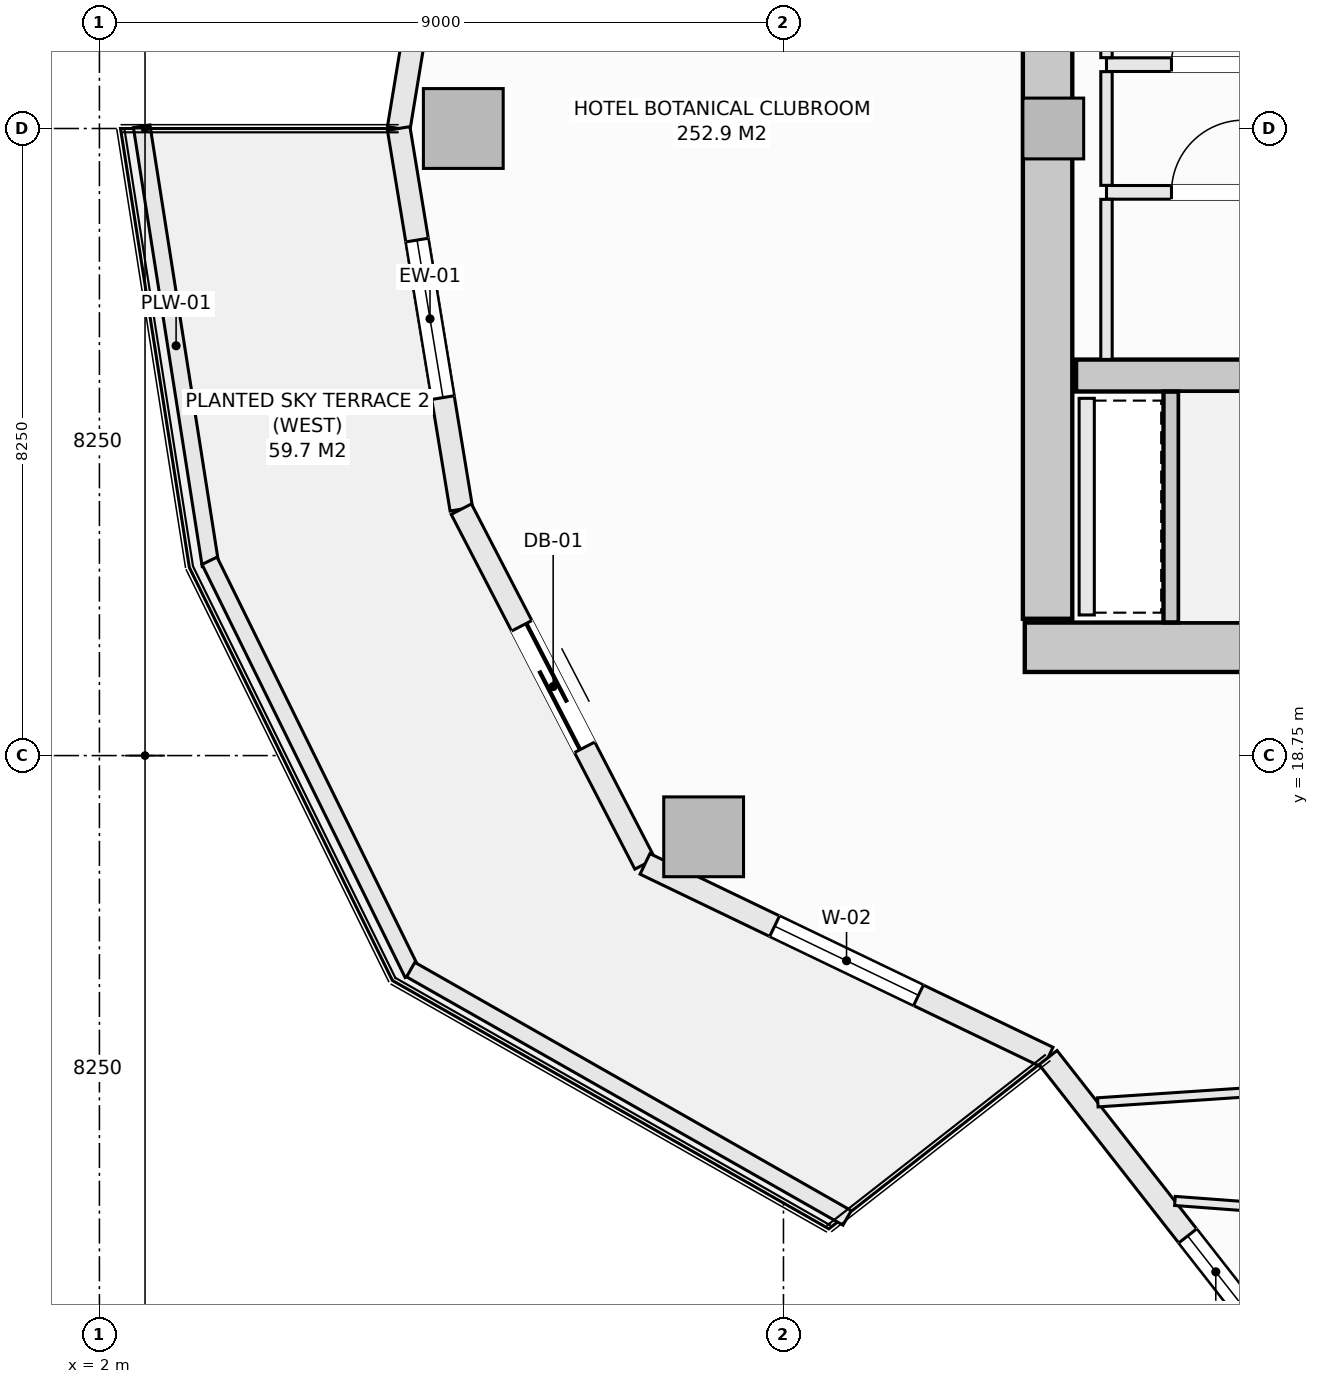
"""IFC4 building model, lengths in metres.
Left out: names, types, materials, properties, quantities, classifications, styles, units other than length and angle.
Written with IfcOpenShell. Run it as: python <this file> out.ifc"""

import sys

from ifc_helpers import new_model, si_unit, direction, frame, frame_2d, origin, origin_2d, place, context, subcontext, project, spatial, rectangle, extrude, element, fill, save


model = new_model("IFC4")
c1 = context("Model", 3, precision=1e-05, world=origin(), true_north=direction((0.0, 1.0)))
c2 = subcontext(c1, "Body", "Model", "MODEL_VIEW")
j1 = project(units=[si_unit("LENGTHUNIT", "METRE"), si_unit("PLANEANGLEUNIT", "RADIAN")], contexts=[c1])
p1 = place(None, origin())
s1 = spatial("IfcSite", under=j1, at=p1, CompositionType="ELEMENT")
p2 = place(p1, origin())
s2 = spatial("IfcBuilding", under=s1, at=p2, CompositionType="ELEMENT")
p3 = place(p2, frame((0.0, 0.0, 125.7)))
s3 = spatial("IfcBuildingStorey", under=s2, at=p3, CompositionType="ELEMENT", Elevation=125.7)
p4 = place(p3, frame((14.175, 20.175, -0.27), z_axis=(0.0, 0.0, 1.0), x_axis=(1.0, 0.0, 0.0)))
e1 = element("IfcWall", 1, at=p4, inside=s3, PredefinedType="SHEAR", context=c2, shape_type="SweptSolid", body=[
    extrude(rectangle(XDim=13.65, YDim=0.65, at=frame_2d((6.825, 0.0))), origin(), (0.0, 0.0, 1.0), 3.4),
])
p5 = place(p3, frame((14.475, 20.55, -0.27), z_axis=(0.0, 0.0, 1.0), x_axis=(0.0, 1.0, 0.0)))
e2 = element("IfcWall", 2, at=p5, inside=s3, PredefinedType="SHEAR", context=c2, shape_type="SweptSolid", body=[
    extrude(rectangle(XDim=12.9, YDim=0.65, at=frame_2d((6.45, 0.0))), origin(), (0.0, 0.0, 1.0), 3.4),
])
p6 = place(p3, frame((14.85, 23.75, -0.27), z_axis=(0.0, 0.0, 1.0), x_axis=(1.0, 0.0, 0.0)))
e3 = element("IfcWall", 3, at=p6, inside=s3, PredefinedType="SHEAR", context=c2, shape_type="SweptSolid", body=[
    extrude(rectangle(XDim=7.3, YDim=0.42, at=frame_2d((3.65, 0.0))), origin(), (0.0, 0.0, 1.0), 3.4),
])
for number, where, z_axis, x_axis in (
    (4, (6.788, 27.0, -0.27), (0.0, 0.0, 1.0), (1.0, 0.0, 0.0)),
    (5, (9.95, 17.681, -0.27), (0.0, 0.0, 1.0), (1.0, 0.0, 0.0)),
):
    element("IfcColumn", number, at=place(p3, frame(where, z_axis=z_axis, x_axis=x_axis)), inside=s3, PredefinedType="COLUMN", context=c2, shape_type="SweptSolid", body=[
        extrude(rectangle(XDim=1.05, YDim=1.05, at=origin_2d()), origin(), (0.0, 0.0, 1.0), 3.4),
    ])
p7 = place(p3, frame((14.55, 27.0, -0.27), z_axis=(0.0, 0.0, 1.0), x_axis=(1.0, 0.0, 0.0)))
e6 = element("IfcColumn", 6, at=p7, inside=s3, PredefinedType="PILASTER", context=c2, shape_type="SweptSolid", body=[
    extrude(rectangle(XDim=0.8, YDim=0.8, at=origin_2d()), origin(), (0.0, 0.0, 1.0), 3.4),
])
p8 = place(p3, frame((5.938, 27.0, 0.0), z_axis=(0.0, 0.0, 1.0), x_axis=(0.162393944769, 0.986726003864, 0.0)))
e7 = element("IfcWall", 7, at=p8, inside=s3, PredefinedType="SOLIDWALL", context=c2, shape_type="SweptSolid", body=[
    extrude(rectangle(XDim=5.075, YDim=0.3, at=frame_2d((2.538, 0.0))), origin(), (0.0, 0.0, 1.0), 2.653),
])
p9 = place(p8, frame((1.488, 0.0, 0.74)))
e8 = element("IfcOpeningElement", 8, at=p9, cuts=e7, PredefinedType="OPENING", context=c2, shape_type="SweptSolid", body=[
    extrude(rectangle(XDim=2.1, YDim=1.7, at=frame_2d((1.05, 0.85))), frame((0.0, 0.16, 0.0), z_axis=(0.0, -1.0, 0.0), x_axis=(1.0, 0.0, 0.0)), (0.0, 0.0, 1.0), 0.32),
])
p10 = place(p3, frame((5.938, 27.0, 0.0), z_axis=(0.0, 0.0, 1.0), x_axis=(0.162393944769, -0.986726003864, 0.0)))
e9 = element("IfcWall", 9, at=p10, inside=s3, PredefinedType="SOLIDWALL", context=c2, shape_type="SweptSolid", body=[
    extrude(rectangle(XDim=5.075, YDim=0.3, at=frame_2d((2.538, 0.0))), origin(), (0.0, 0.0, 1.0), 2.653),
])
p11 = place(p10, frame((1.488, 0.0, 0.74)))
e10 = element("IfcOpeningElement", 10, at=p11, cuts=e9, PredefinedType="OPENING", context=c2, shape_type="SweptSolid", body=[
    extrude(rectangle(XDim=2.1, YDim=1.7, at=frame_2d((1.05, 0.85))), frame((0.0, 0.16, 0.0), z_axis=(0.0, -1.0, 0.0), x_axis=(1.0, 0.0, 0.0)), (0.0, 0.0, 1.0), 0.32),
])
p12 = place(p3, frame((6.762, 21.992, 0.0), z_axis=(0.0, 0.0, 1.0), x_axis=(0.459767899643, -0.888039119892, 0.0)))
e11 = element("IfcWall", 11, at=p12, inside=s3, PredefinedType="SOLIDWALL", context=c2, shape_type="SweptSolid", body=[
    extrude(rectangle(XDim=5.255, YDim=0.3, at=frame_2d((2.628, 0.0))), origin(), (0.0, 0.0, 1.0), 2.653),
])
p13 = place(p12, frame((1.728, 0.0, 0.0)))
e12 = element("IfcOpeningElement", 12, at=p13, cuts=e11, PredefinedType="OPENING", context=c2, shape_type="SweptSolid", body=[
    extrude(rectangle(XDim=1.8, YDim=2.25, at=frame_2d((0.9, 1.125))), frame((0.0, 0.16, 0.0), z_axis=(0.0, -1.0, 0.0), x_axis=(1.0, 0.0, 0.0)), (0.0, 0.0, 1.0), 0.32),
])
p14 = place(p3, frame((9.178, 17.325, 0.0), z_axis=(0.0, 0.0, 1.0), x_axis=(0.901370184739, -0.433049408339, 0.0)))
e13 = element("IfcWall", 13, at=p14, inside=s3, PredefinedType="SOLIDWALL", context=c2, shape_type="SweptSolid", body=[
    extrude(rectangle(XDim=5.884, YDim=0.3, at=frame_2d((2.942, 0.0))), origin(), (0.0, 0.0, 1.0), 2.653),
])
p15 = place(p14, frame((1.892, 0.0, 0.74)))
e14 = element("IfcOpeningElement", 14, at=p15, cuts=e13, PredefinedType="OPENING", context=c2, shape_type="SweptSolid", body=[
    extrude(rectangle(XDim=2.1, YDim=1.7, at=frame_2d((1.05, 0.85))), frame((0.0, 0.16, 0.0), z_axis=(0.0, -1.0, 0.0), x_axis=(1.0, 0.0, 0.0)), (0.0, 0.0, 1.0), 0.32),
])
p16 = place(p3, frame((14.481, 14.777, 0.0), z_axis=(0.0, 0.0, 1.0), x_axis=(0.616435134162, -0.787405693001, 0.0)))
e15 = element("IfcWall", 15, at=p16, inside=s3, PredefinedType="SOLIDWALL", context=c2, shape_type="SweptSolid", body=[
    extrude(rectangle(XDim=5.759, YDim=0.3, at=frame_2d((2.879, 0.0))), origin(), (0.0, 0.0, 1.0), 2.653),
])
p17 = place(p16, frame((2.98, 0.0, 0.72)))
e16 = element("IfcOpeningElement", 16, at=p17, cuts=e15, PredefinedType="OPENING", context=c2, shape_type="SweptSolid", body=[
    extrude(rectangle(XDim=1.2, YDim=1.65, at=frame_2d((0.6, 0.825))), frame((0.0, 0.16, 0.0), z_axis=(0.0, -1.0, 0.0), x_axis=(1.0, 0.0, 0.0)), (0.0, 0.0, 1.0), 0.32),
])
p18 = place(p3, frame((2.556, 27.029, 0.0), z_axis=(0.0, 0.0, 1.0), x_axis=(0.154903030247, -0.987929679289, 0.0)))
e17 = element("IfcWall", 17, at=p18, inside=s3, PredefinedType="PARAPET", context=c2, shape_type="SweptSolid", body=[
    extrude(rectangle(XDim=5.846, YDim=0.22, at=frame_2d((2.923, 0.0))), origin(), (0.0, 0.0, 1.0), 0.52),
])
p19 = place(p3, frame((3.449, 21.313, 0.0), z_axis=(0.0, 0.0, 1.0), x_axis=(0.441269631716, -0.897374566235, 0.0)))
e18 = element("IfcWall", 18, at=p19, inside=s3, PredefinedType="PARAPET", context=c2, shape_type="SweptSolid", body=[
    extrude(rectangle(XDim=6.056, YDim=0.22, at=frame_2d((3.028, 0.0))), origin(), (0.0, 0.0, 1.0), 0.52),
])
p20 = place(p3, frame((6.095, 15.934, 0.0), z_axis=(0.0, 0.0, 1.0), x_axis=(0.869187658335, -0.494482370361, 0.0)))
e19 = element("IfcWall", 19, at=p20, inside=s3, PredefinedType="PARAPET", context=c2, shape_type="SweptSolid", body=[
    extrude(rectangle(XDim=6.606, YDim=0.22, at=frame_2d((3.303, 0.0))), origin(), (0.0, 0.0, 1.0), 0.52),
])
p21 = place(p3, frame((16.1, 20.502, -0.27), z_axis=(0.0, 0.0, 1.0), x_axis=(0.0, 1.0, 0.0)))
e20 = element("IfcWall", 20, at=p21, inside=s3, PredefinedType="SHEAR", context=c2, shape_type="SweptSolid", body=[
    extrude(rectangle(XDim=3.036, YDim=0.2, at=frame_2d((1.518, 0.0))), origin(), (0.0, 0.0, 1.0), 3.4),
])
p22 = place(p3, frame((14.99, 20.6, 0.0), z_axis=(0.0, 0.0, 1.0), x_axis=(0.0, 1.0, 0.0)))
e21 = element("IfcWall", 21, at=p22, inside=s3, PredefinedType="SOLIDWALL", context=c2, shape_type="SweptSolid", body=[
    extrude(rectangle(XDim=2.85, YDim=0.2, at=frame_2d((1.425, 0.0))), origin(), (0.0, 0.0, 1.0), 3.13),
])
p23 = place(p3, frame((15.25, 27.84, 0.0), z_axis=(0.0, 0.0, 1.0), x_axis=(1.0, 0.0, 0.0)))
e22 = element("IfcWall", 22, at=p23, inside=s3, PredefinedType="SOLIDWALL", context=c2, shape_type="SweptSolid", body=[
    extrude(rectangle(XDim=6.9, YDim=0.18, at=frame_2d((3.45, 0.0))), origin(), (0.0, 0.0, 1.0), 3.13),
])
p24 = place(p23, frame((5.02, 0.0, 0.0)))
e23 = element("IfcOpeningElement", 23, at=p24, cuts=e22, PredefinedType="OPENING", context=c2, shape_type="SweptSolid", body=[
    extrude(rectangle(XDim=0.95, YDim=2.1, at=frame_2d((0.475, 1.05))), frame((0.0, 0.1, 0.0), z_axis=(0.0, -1.0, 0.0), x_axis=(1.0, 0.0, 0.0)), (0.0, 0.0, 1.0), 0.2),
])
p25 = place(p23, frame((0.855, 0.0, 0.0)))
e24 = element("IfcOpeningElement", 24, at=p25, cuts=e22, PredefinedType="OPENING", context=c2, shape_type="SweptSolid", body=[
    extrude(rectangle(XDim=0.95, YDim=2.1, at=frame_2d((0.475, 1.05))), frame((0.0, 0.1, 0.0), z_axis=(0.0, -1.0, 0.0), x_axis=(1.0, 0.0, 0.0)), (0.0, 0.0, 1.0), 0.2),
])
p26 = place(p23, frame((2.9, 0.0, 0.0)))
e25 = element("IfcOpeningElement", 25, at=p26, cuts=e22, PredefinedType="OPENING", context=c2, shape_type="SweptSolid", body=[
    extrude(rectangle(XDim=0.95, YDim=2.1, at=frame_2d((0.475, 1.05))), frame((0.0, 0.1, 0.0), z_axis=(0.0, -1.0, 0.0), x_axis=(1.0, 0.0, 0.0)), (0.0, 0.0, 1.0), 0.2),
])
p27 = place(p3, frame((15.25, 26.16, 0.0), z_axis=(0.0, 0.0, 1.0), x_axis=(1.0, 0.0, 0.0)))
e26 = element("IfcWall", 26, at=p27, inside=s3, PredefinedType="SOLIDWALL", context=c2, shape_type="SweptSolid", body=[
    extrude(rectangle(XDim=6.9, YDim=0.18, at=frame_2d((3.45, 0.0))), origin(), (0.0, 0.0, 1.0), 3.13),
])
p28 = place(p27, frame((5.02, 0.0, 0.0)))
e27 = element("IfcOpeningElement", 27, at=p28, cuts=e26, PredefinedType="OPENING", context=c2, shape_type="SweptSolid", body=[
    extrude(rectangle(XDim=0.95, YDim=2.1, at=frame_2d((0.475, 1.05))), frame((0.0, 0.1, 0.0), z_axis=(0.0, -1.0, 0.0), x_axis=(1.0, 0.0, 0.0)), (0.0, 0.0, 1.0), 0.2),
])
p29 = place(p27, frame((0.855, 0.0, 0.0)))
e28 = element("IfcOpeningElement", 28, at=p29, cuts=e26, PredefinedType="OPENING", context=c2, shape_type="SweptSolid", body=[
    extrude(rectangle(XDim=0.95, YDim=2.1, at=frame_2d((0.475, 1.05))), frame((0.0, 0.1, 0.0), z_axis=(0.0, -1.0, 0.0), x_axis=(1.0, 0.0, 0.0)), (0.0, 0.0, 1.0), 0.2),
])
p30 = place(p27, frame((2.9, 0.0, 0.0)))
e29 = element("IfcOpeningElement", 29, at=p30, cuts=e26, PredefinedType="OPENING", context=c2, shape_type="SweptSolid", body=[
    extrude(rectangle(XDim=0.95, YDim=2.1, at=frame_2d((0.475, 1.05))), frame((0.0, 0.1, 0.0), z_axis=(0.0, -1.0, 0.0), x_axis=(1.0, 0.0, 0.0)), (0.0, 0.0, 1.0), 0.2),
])
p31 = place(p3, frame((15.25, 23.962, 0.0), z_axis=(0.0, 0.0, 1.0), x_axis=(0.0, 1.0, 0.0)))
e30 = element("IfcWall", 30, at=p31, inside=s3, PredefinedType="PARTITIONING", context=c2, shape_type="SweptSolid", body=[
    extrude(rectangle(XDim=2.106, YDim=0.15, at=frame_2d((1.053, 0.0))), origin(), (0.0, 0.0, 1.0), 3.13),
])
p32 = place(p3, frame((15.25, 26.252, 0.0), z_axis=(0.0, 0.0, 1.0), x_axis=(0.0, 1.0, 0.0)))
e31 = element("IfcWall", 31, at=p32, inside=s3, PredefinedType="PARTITIONING", context=c2, shape_type="SweptSolid", body=[
    extrude(rectangle(XDim=1.496, YDim=0.15, at=frame_2d((0.748, 0.0))), origin(), (0.0, 0.0, 1.0), 3.13),
])
p33 = place(p3, frame((15.25, 27.932, 0.0), z_axis=(0.0, 0.0, 1.0), x_axis=(0.0, 1.0, 0.0)))
e32 = element("IfcWall", 32, at=p33, inside=s3, PredefinedType="PARTITIONING", context=c2, shape_type="SweptSolid", body=[
    extrude(rectangle(XDim=2.106, YDim=0.15, at=frame_2d((1.053, 0.0))), origin(), (0.0, 0.0, 1.0), 3.13),
])
p34 = place(p3, frame((15.135, 14.188, 0.0), z_axis=(0.0, 0.0, 1.0), x_axis=(0.997761371355, 0.066874852018, 0.0)))
e33 = element("IfcWall", 33, at=p34, inside=s3, PredefinedType="PARTITIONING", context=c2, shape_type="SweptSolid", body=[
    extrude(rectangle(XDim=7.696, YDim=0.12, at=frame_2d((3.848, 0.0))), origin(), (0.0, 0.0, 1.0), 3.13),
])
p35 = place(p3, frame((16.151, 12.891, 0.0), z_axis=(0.0, 0.0, 1.0), x_axis=(0.997218948609, -0.074527636054, 0.0)))
e34 = element("IfcWall", 34, at=p35, inside=s3, PredefinedType="PARTITIONING", context=c2, shape_type="SweptSolid", body=[
    extrude(rectangle(XDim=10.968, YDim=0.12, at=frame_2d((5.484, 0.0))), origin(), (0.0, 0.0, 1.0), 2.653),
])
p36 = place(p11, origin())
e35 = element("IfcWindow", 35, at=p36, inside=s3, PartitioningType="SINGLE_PANEL", PredefinedType="WINDOW", context=c2, shape_type="SweptSolid", body=[
    extrude(rectangle(XDim=2.1, YDim=1.7, at=frame_2d((1.05, 0.85))), frame((0.0, 0.03, 0.0), z_axis=(0.0, -1.0, 0.0), x_axis=(1.0, 0.0, 0.0)), (0.0, 0.0, 1.0), 0.06),
])
fill(e10, e35)
p37 = place(p13, frame((1.8, 0.0, 0.0), z_axis=(0.0, 0.0, 1.0), x_axis=(-1.0, 0.0, 0.0)))
e36 = element("IfcDoor", 36, at=p37, inside=s3, OperationType="SLIDING_TO_LEFT", PredefinedType="DOOR", context=c2, shape_type="SweptSolid", body=[
    extrude(rectangle(XDim=1.8, YDim=2.25, at=frame_2d((0.9, 1.125))), frame((0.0, 0.025, 0.0), z_axis=(0.0, -1.0, 0.0), x_axis=(1.0, 0.0, 0.0)), (0.0, 0.0, 1.0), 0.05),
])
fill(e12, e36)
p38 = place(p15, origin())
e37 = element("IfcWindow", 37, at=p38, inside=s3, PartitioningType="SINGLE_PANEL", PredefinedType="WINDOW", context=c2, shape_type="SweptSolid", body=[
    extrude(rectangle(XDim=2.1, YDim=1.7, at=frame_2d((1.05, 0.85))), frame((0.0, 0.03, 0.0), z_axis=(0.0, -1.0, 0.0), x_axis=(1.0, 0.0, 0.0)), (0.0, 0.0, 1.0), 0.06),
])
fill(e14, e37)
p39 = place(p17, origin())
e38 = element("IfcWindow", 38, at=p39, inside=s3, PartitioningType="SINGLE_PANEL", PredefinedType="WINDOW", context=c2, shape_type="SweptSolid", body=[
    extrude(rectangle(XDim=1.2, YDim=1.65, at=frame_2d((0.6, 0.825))), frame((0.0, 0.03, 0.0), z_axis=(0.0, -1.0, 0.0), x_axis=(1.0, 0.0, 0.0)), (0.0, 0.0, 1.0), 0.06),
])
fill(e16, e38)
p40 = place(p25, origin())
e39 = element("IfcDoor", 39, at=p40, inside=s3, OperationType="SINGLE_SWING_RIGHT", PredefinedType="DOOR", context=c2, shape_type="SweptSolid", body=[
    extrude(rectangle(XDim=0.95, YDim=2.1, at=frame_2d((0.475, 1.05))), frame((0.0, 0.025, 0.0), z_axis=(0.0, -1.0, 0.0), x_axis=(1.0, 0.0, 0.0)), (0.0, 0.0, 1.0), 0.05),
])
fill(e24, e39)
p41 = place(p29, origin())
e40 = element("IfcDoor", 40, at=p41, inside=s3, OperationType="SINGLE_SWING_RIGHT", PredefinedType="DOOR", context=c2, shape_type="SweptSolid", body=[
    extrude(rectangle(XDim=0.95, YDim=2.1, at=frame_2d((0.475, 1.05))), frame((0.0, 0.025, 0.0), z_axis=(0.0, -1.0, 0.0), x_axis=(1.0, 0.0, 0.0)), (0.0, 0.0, 1.0), 0.05),
])
fill(e28, e40)
save(model, sys.argv[1])
